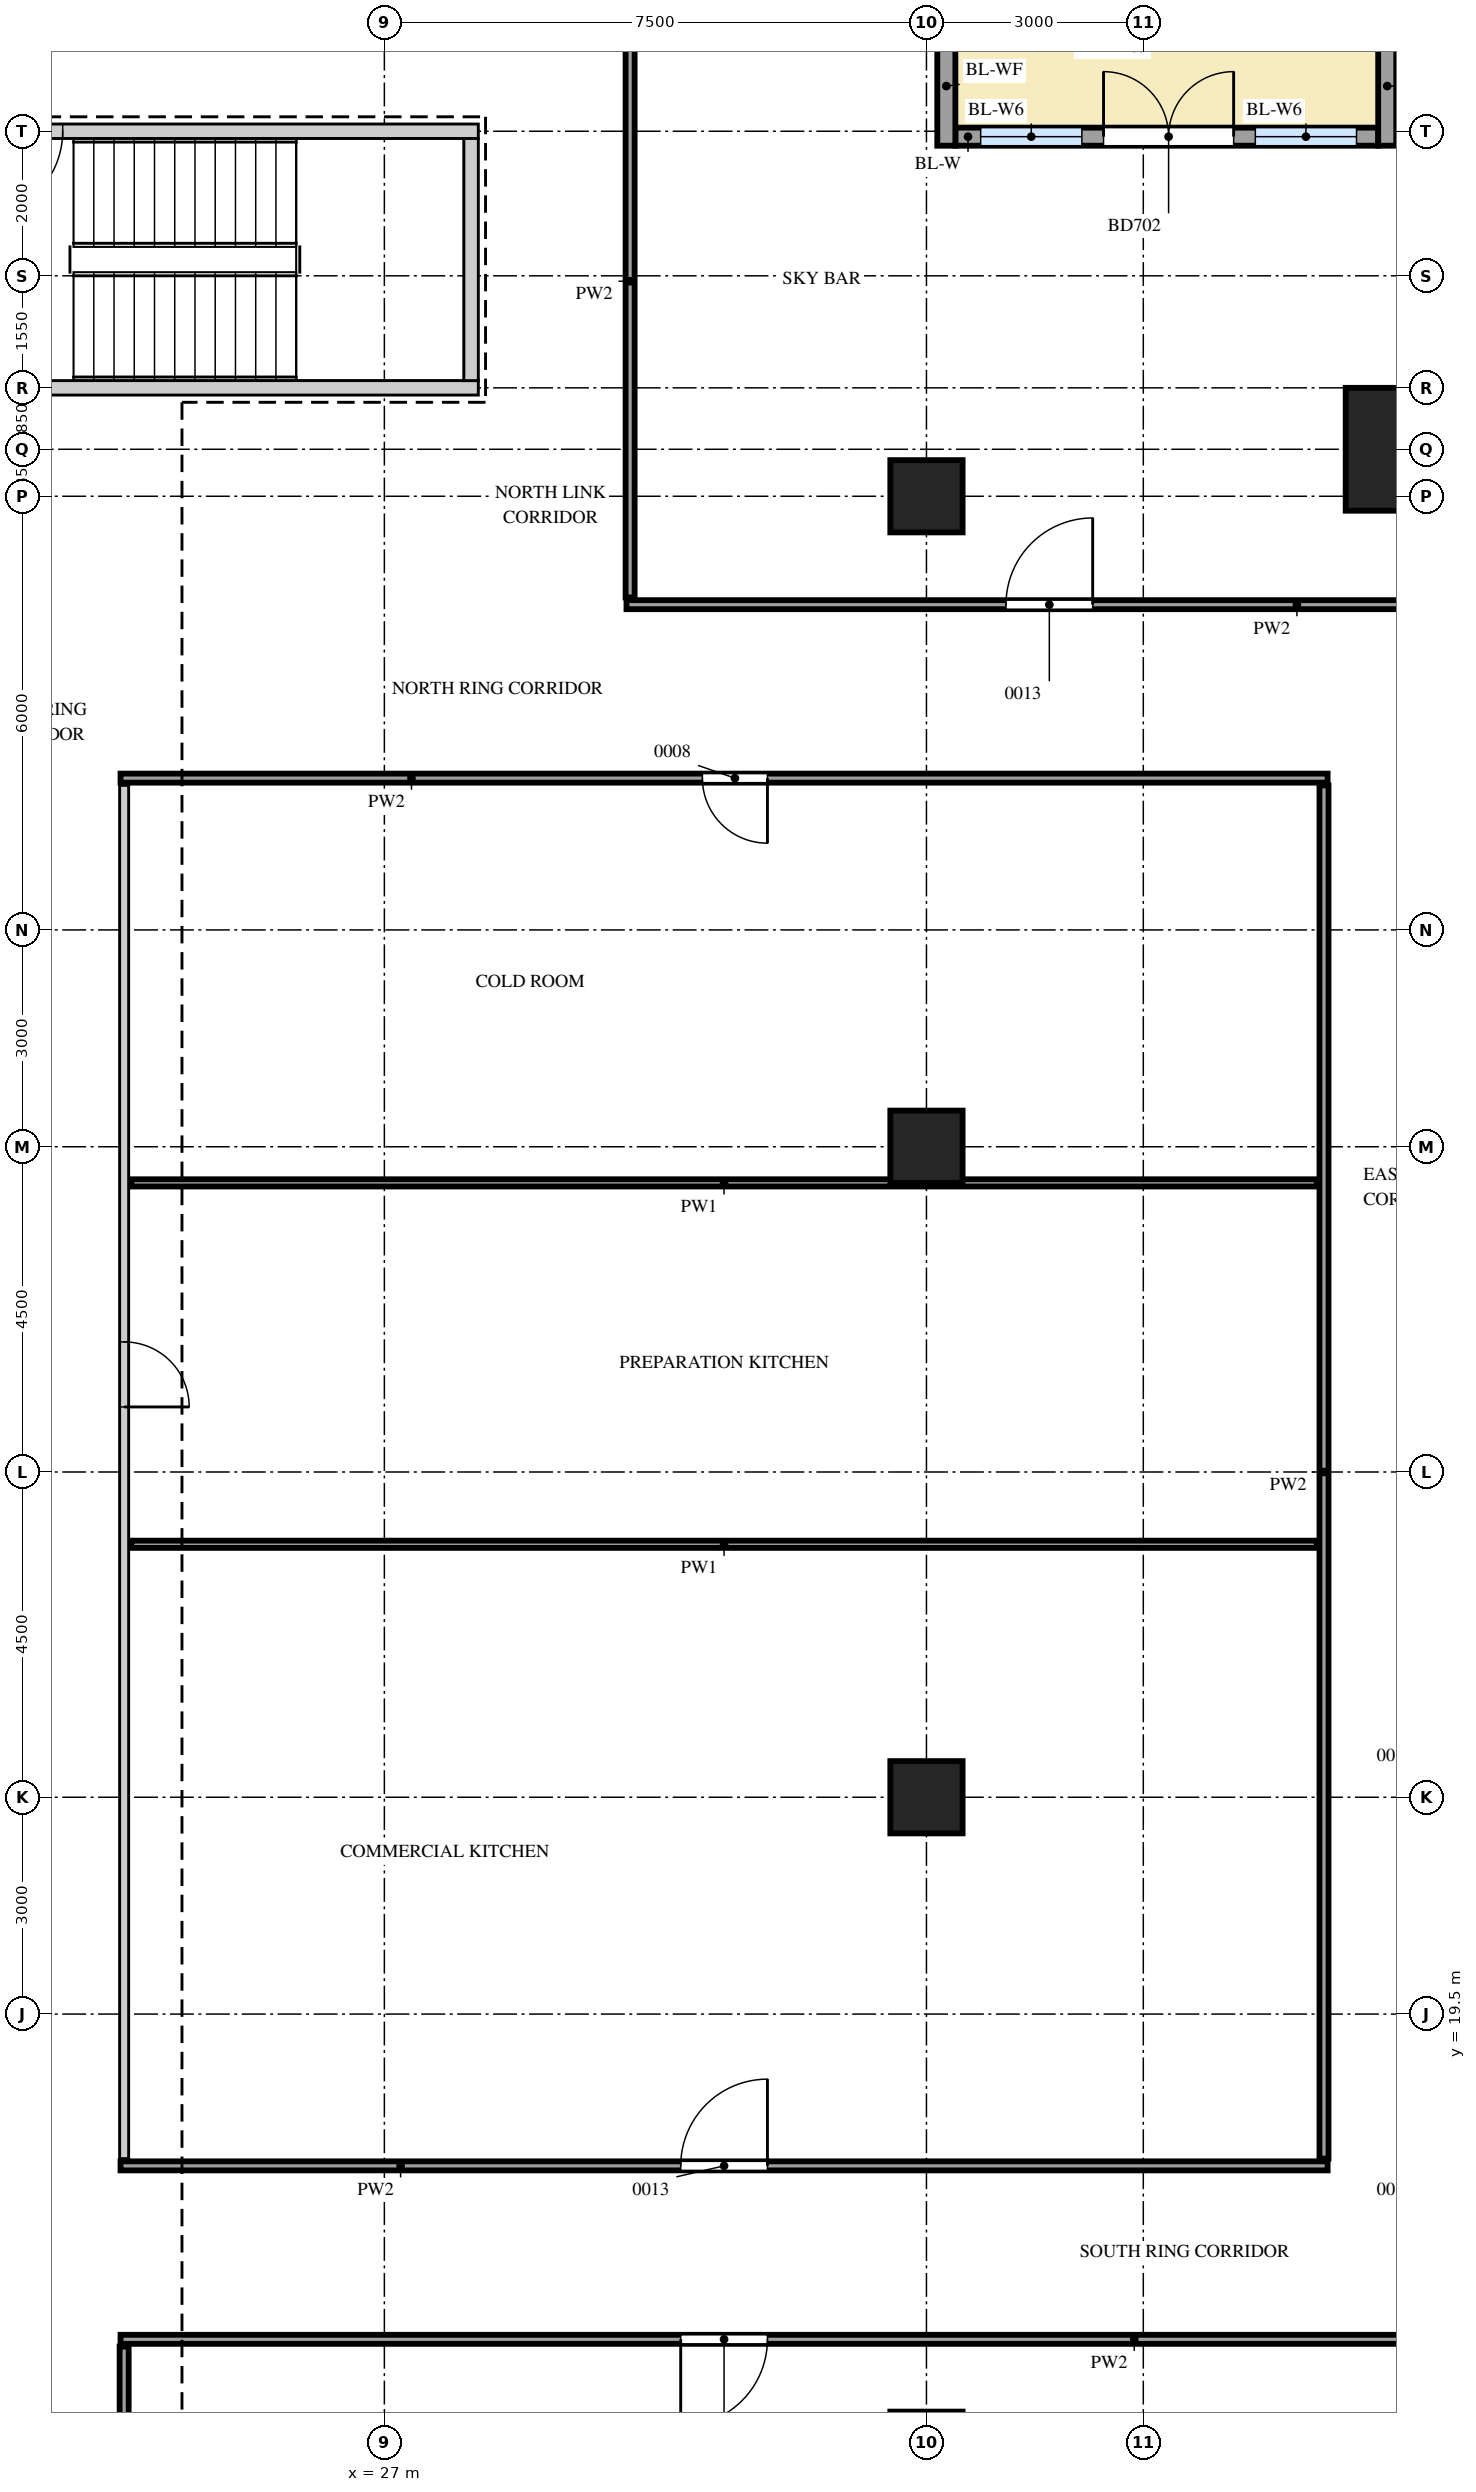
"""IFC4 building model, lengths in metres.
Left out: names, types, materials, properties, quantities, classifications, styles, units other than length and angle.
Written with IfcOpenShell. Run it as: python <this file> out.ifc"""

import sys

from ifc_helpers import new_model, si_unit, direction, frame, frame_2d, origin, origin_2d, place, context, subcontext, project, spatial, rectangle, extrude, source, transform, mapped, element, fill, save


model = new_model("IFC4")
c1 = context("Model", 3, precision=1e-05, world=origin(), true_north=direction((0.0, 1.0)))
c2 = subcontext(c1, "Body", "Model", "MODEL_VIEW")
j1 = project(units=[si_unit("LENGTHUNIT", "METRE"), si_unit("PLANEANGLEUNIT", "RADIAN")], contexts=[c1])
p1 = place(None, origin())
s1 = spatial("IfcSite", under=j1, at=p1, CompositionType="ELEMENT")
p2 = place(p1, origin())
s2 = spatial("IfcBuilding", under=s1, at=p2, CompositionType="ELEMENT")
p3 = place(p2, frame((0.0, 0.0, 310.2)))
s3 = spatial("IfcBuildingStorey", under=s2, at=p3, CompositionType="ELEMENT", Elevation=310.2)
m1 = source(origin(), c2, "Body", "SweptSolid", [
    extrude(rectangle(XDim=7.1, YDim=0.2, at=frame_2d((3.55, 0.0))), origin(), (0.0, 0.0, 1.0), 3.75),
])
p4 = place(p3, frame((21.2, 45.55, 0.0), z_axis=(0.0, 0.0, 1.0), x_axis=(1.0, 0.0, 0.0)))
e1 = element("IfcWall", 1, at=p4, inside=s3, PredefinedType="SHEAR", context=c2, shape_type="MappedRepresentation", body=[
    mapped(m1, transform((0.0, 0.0, 0.0))),
])
m2 = source(origin(), c2, "Body", "SweptSolid", [
    extrude(rectangle(XDim=1.2, YDim=2.1, at=frame_2d((0.6, 1.05))), frame((0.0, 0.11, 0.0), z_axis=(0.0, -1.0, 0.0), x_axis=(1.0, 0.0, 0.0)), (0.0, 0.0, 1.0), 0.22),
])
p5 = place(p4, frame((0.15, 0.0, 0.0)))
e2 = element("IfcOpeningElement", 2, at=p5, cuts=e1, PredefinedType="OPENING", context=c2, shape_type="MappedRepresentation", body=[
    mapped(m2, transform((0.0, 0.0, 0.0))),
])
p6 = place(p3, frame((21.2, 42.0, 0.0), z_axis=(0.0, 0.0, 1.0), x_axis=(1.0, 0.0, 0.0)))
e3 = element("IfcWall", 3, at=p6, inside=s3, PredefinedType="SHEAR", context=c2, shape_type="MappedRepresentation", body=[
    mapped(m1, transform((0.0, 0.0, 0.0))),
])
m3 = source(origin(), c2, "Body", "SweptSolid", [
    extrude(rectangle(XDim=3.35, YDim=0.2, at=frame_2d((1.675, 0.0))), origin(), (0.0, 0.0, 1.0), 3.75),
])
p7 = place(p3, frame((28.2, 42.1, 0.0), z_axis=(0.0, 0.0, 1.0), x_axis=(0.0, 1.0, 0.0)))
e4 = element("IfcWall", 4, at=p7, inside=s3, PredefinedType="SHEAR", context=c2, shape_type="MappedRepresentation", body=[
    mapped(m3, transform((0.0, 0.0, 0.0))),
])
m4 = source(origin(), c2, "Body", "SweptSolid", [
    extrude(rectangle(XDim=1.7, YDim=1.7, at=origin_2d()), origin(), (0.0, 0.0, 1.0), 3.75),
])
p8 = place(p3, frame((41.15, 41.15, 0.0), z_axis=(0.0, 0.0, 1.0), x_axis=(1.0, 0.0, 0.0)))
e5 = element("IfcColumn", 5, at=p8, inside=s3, PredefinedType="COLUMN", context=c2, shape_type="MappedRepresentation", body=[
    mapped(m4, transform((0.0, 0.0, 0.0))),
])
m5 = source(origin(), c2, "Body", "SweptSolid", [
    extrude(rectangle(XDim=1.0, YDim=1.0, at=origin_2d()), origin(), (0.0, 0.0, 1.0), 3.75),
])
for number, where, z_axis, x_axis in (
    (6, (34.5, 22.5, 0.0), (0.0, 0.0, 1.0), (1.0, 0.0, 0.0)),
    (7, (34.5, 31.5, 0.0), (0.0, 0.0, 1.0), (1.0, 0.0, 0.0)),
    (8, (34.5, 40.5, 0.0), (0.0, 0.0, 1.0), (1.0, 0.0, 0.0)),
):
    element("IfcColumn", number, at=place(p3, frame(where, z_axis=z_axis, x_axis=x_axis)), inside=s3, PredefinedType="COLUMN", context=c2, shape_type="MappedRepresentation", body=[
        mapped(m5, transform((0.0, 0.0, 0.0))),
    ])
m6 = source(origin(), c2, "Body", "SweptSolid", [
    extrude(rectangle(XDim=5.85, YDim=0.25, at=frame_2d((2.925, 0.0))), origin(), (0.0, 0.0, 1.0), 3.75),
])
p9 = place(p3, frame((34.9, 45.475, 0.0), z_axis=(0.0, 0.0, 1.0), x_axis=(1.0, 0.0, 0.0)))
e9 = element("IfcWall", 9, at=p9, inside=s3, PredefinedType="SOLIDWALL", context=c2, shape_type="MappedRepresentation", body=[
    mapped(m6, transform((0.0, 0.0, 0.0))),
])
m7 = source(origin(), c2, "Body", "SweptSolid", [
    extrude(rectangle(XDim=1.4, YDim=2.4, at=frame_2d((0.7, 1.2))), frame((0.0, 0.135, 0.0), z_axis=(0.0, -1.0, 0.0), x_axis=(1.0, 0.0, 0.0)), (0.0, 0.0, 1.0), 0.27),
])
p10 = place(p9, frame((0.35, 0.0, 0.0)))
e10 = element("IfcOpeningElement", 10, at=p10, cuts=e9, PredefinedType="OPENING", context=c2, shape_type="MappedRepresentation", body=[
    mapped(m7, transform((0.0, 0.0, 0.0))),
])
p11 = place(p9, frame((4.15, 0.0, 0.0)))
e11 = element("IfcOpeningElement", 11, at=p11, cuts=e9, PredefinedType="OPENING", context=c2, shape_type="MappedRepresentation", body=[
    mapped(m7, transform((0.0, 0.0, 0.0))),
])
m8 = source(origin(), c2, "Body", "SweptSolid", [
    extrude(rectangle(XDim=1.8, YDim=2.4, at=frame_2d((0.9, 1.2))), frame((0.0, 0.135, 0.0), z_axis=(0.0, -1.0, 0.0), x_axis=(1.0, 0.0, 0.0)), (0.0, 0.0, 1.0), 0.27),
])
p12 = place(p9, frame((2.05, 0.0, 0.0)))
e12 = element("IfcOpeningElement", 12, at=p12, cuts=e9, PredefinedType="OPENING", context=c2, shape_type="MappedRepresentation", body=[
    mapped(m8, transform((0.0, 0.0, 0.0))),
])
m9 = source(origin(), c2, "Body", "SweptSolid", [
    extrude(rectangle(XDim=1.65, YDim=0.25, at=frame_2d((0.825, 0.0))), origin(), (0.0, 0.0, 1.0), 3.45),
])
for number, where, z_axis, x_axis in (
    (13, (34.775, 47.0, 0.0), (0.0, 0.0, 1.0), (0.0, -1.0, 0.0)),
    (14, (40.875, 47.0, 0.0), (0.0, 0.0, 1.0), (0.0, -1.0, 0.0)),
):
    element("IfcWall", number, at=place(p3, frame(where, z_axis=z_axis, x_axis=x_axis)), inside=s3, PredefinedType="SOLIDWALL", context=c2, shape_type="MappedRepresentation", body=[
        mapped(m9, transform((0.0, 0.0, 0.0))),
    ])
m10 = source(origin(), c2, "Body", "SweptSolid", [
    extrude(rectangle(XDim=8.75, YDim=0.125, at=frame_2d((4.375, 0.0))), origin(), (0.0, 0.0, 1.0), 3.8),
])
p13 = place(p3, frame((23.4, 6.15, 0.0), z_axis=(0.0, 0.0, 1.0), x_axis=(0.0, 1.0, 0.0)))
e15 = element("IfcWall", 15, at=p13, inside=s3, PredefinedType="PARTITIONING", context=c2, shape_type="MappedRepresentation", body=[
    mapped(m10, transform((0.0, 0.0, 0.0))),
])
m11 = source(origin(), c2, "Body", "SweptSolid", [
    extrude(rectangle(XDim=19.1, YDim=0.125, at=frame_2d((9.55, 0.0))), origin(), (0.0, 0.0, 1.0), 3.8),
])
p14 = place(p3, frame((23.35, 15.0, 0.0), z_axis=(0.0, 0.0, 1.0), x_axis=(1.0, 0.0, 0.0)))
e16 = element("IfcWall", 16, at=p14, inside=s3, PredefinedType="PARTITIONING", context=c2, shape_type="MappedRepresentation", body=[
    mapped(m11, transform((0.0, 0.0, 0.0))),
])
m12 = source(origin(), c2, "Body", "SweptSolid", [
    extrude(rectangle(XDim=1.2, YDim=2.1, at=frame_2d((0.6, 1.05))), frame((0.0, 0.073, 0.0), z_axis=(0.0, -1.0, 0.0), x_axis=(1.0, 0.0, 0.0)), (0.0, 0.0, 1.0), 0.145),
])
p15 = place(p14, frame((7.75, 0.0, 0.0)))
e17 = element("IfcOpeningElement", 17, at=p15, cuts=e16, PredefinedType="OPENING", context=c2, shape_type="MappedRepresentation", body=[
    mapped(m12, transform((0.0, 0.0, 0.0))),
])
m13 = source(origin(), c2, "Body", "SweptSolid", [
    extrude(rectangle(XDim=16.7, YDim=0.125, at=frame_2d((8.35, 0.0))), origin(), (0.0, 0.0, 1.0), 3.8),
])
p16 = place(p3, frame((23.35, 17.4, 0.0), z_axis=(0.0, 0.0, 1.0), x_axis=(1.0, 0.0, 0.0)))
e18 = element("IfcWall", 18, at=p16, inside=s3, PredefinedType="PARTITIONING", context=c2, shape_type="MappedRepresentation", body=[
    mapped(m13, transform((0.0, 0.0, 0.0))),
])
p17 = place(p16, frame((7.75, 0.0, 0.0)))
e19 = element("IfcOpeningElement", 19, at=p17, cuts=e18, PredefinedType="OPENING", context=c2, shape_type="MappedRepresentation", body=[
    mapped(m12, transform((0.0, 0.0, 0.0))),
])
m14 = source(origin(), c2, "Body", "SweptSolid", [
    extrude(rectangle(XDim=19.0, YDim=0.125, at=frame_2d((9.5, 0.0))), origin(), (0.0, 0.0, 1.0), 3.8),
])
p18 = place(p3, frame((23.4, 17.5, 0.0), z_axis=(0.0, 0.0, 1.0), x_axis=(0.0, 1.0, 0.0)))
e20 = element("IfcWall", 20, at=p18, inside=s3, PredefinedType="PARTITIONING", context=c2, shape_type="MappedRepresentation", body=[
    mapped(m14, transform((0.0, 0.0, 0.0))),
])
m15 = source(origin(), c2, "Body", "SweptSolid", [
    extrude(rectangle(XDim=0.9, YDim=2.1, at=frame_2d((0.45, 1.05))), frame((0.0, 0.073, 0.0), z_axis=(0.0, -1.0, 0.0), x_axis=(1.0, 0.0, 0.0)), (0.0, 0.0, 1.0), 0.145),
])
p19 = place(p18, frame((10.4, 0.0, 0.0)))
e21 = element("IfcOpeningElement", 21, at=p19, cuts=e20, PredefinedType="OPENING", context=c2, shape_type="MappedRepresentation", body=[
    mapped(m15, transform((0.0, 0.0, 0.0))),
])
p20 = place(p3, frame((40.0, 17.5, 0.0), z_axis=(0.0, 0.0, 1.0), x_axis=(0.0, 1.0, 0.0)))
e22 = element("IfcWall", 22, at=p20, inside=s3, PredefinedType="PARTITIONING", context=c2, shape_type="MappedRepresentation", body=[
    mapped(m14, transform((0.0, 0.0, 0.0))),
])
m16 = source(origin(), c2, "Body", "SweptSolid", [
    extrude(rectangle(XDim=16.4, YDim=0.1, at=frame_2d((8.2, 0.0))), origin(), (0.0, 0.0, 1.0), 3.8),
])
for number, where, z_axis, x_axis in (
    (23, (23.5, 26.0, 0.0), (0.0, 0.0, 1.0), (1.0, 0.0, 0.0)),
    (24, (23.5, 31.0, 0.0), (0.0, 0.0, 1.0), (1.0, 0.0, 0.0)),
):
    element("IfcWall", number, at=place(p3, frame(where, z_axis=z_axis, x_axis=x_axis)), inside=s3, PredefinedType="PARTITIONING", context=c2, shape_type="MappedRepresentation", body=[
        mapped(m16, transform((0.0, 0.0, 0.0))),
    ])
p21 = place(p3, frame((23.35, 36.6, 0.0), z_axis=(0.0, 0.0, 1.0), x_axis=(1.0, 0.0, 0.0)))
e25 = element("IfcWall", 25, at=p21, inside=s3, PredefinedType="PARTITIONING", context=c2, shape_type="MappedRepresentation", body=[
    mapped(m13, transform((0.0, 0.0, 0.0))),
])
p22 = place(p21, frame((8.05, 0.0, 0.0)))
e26 = element("IfcOpeningElement", 26, at=p22, cuts=e25, PredefinedType="OPENING", context=c2, shape_type="MappedRepresentation", body=[
    mapped(m15, transform((0.0, 0.0, 0.0))),
])
m17 = source(origin(), c2, "Body", "SweptSolid", [
    extrude(rectangle(XDim=12.1, YDim=0.125, at=frame_2d((6.05, 0.0))), origin(), (0.0, 0.0, 1.0), 3.8),
])
p23 = place(p3, frame((30.35, 39.0, 0.0), z_axis=(0.0, 0.0, 1.0), x_axis=(1.0, 0.0, 0.0)))
e27 = element("IfcWall", 27, at=p23, inside=s3, PredefinedType="PARTITIONING", context=c2, shape_type="MappedRepresentation", body=[
    mapped(m17, transform((0.0, 0.0, 0.0))),
])
p24 = place(p23, frame((5.25, 0.0, 0.0)))
e28 = element("IfcOpeningElement", 28, at=p24, cuts=e27, PredefinedType="OPENING", context=c2, shape_type="MappedRepresentation", body=[
    mapped(m12, transform((0.0, 0.0, 0.0))),
])
p25 = place(p3, frame((30.4, 39.1, 0.0), z_axis=(0.0, 0.0, 1.0), x_axis=(0.0, 1.0, 0.0)))
e29 = element("IfcWall", 29, at=p25, inside=s3, PredefinedType="PARTITIONING", context=c2, shape_type="MappedRepresentation", body=[
    mapped(m10, transform((0.0, 0.0, 0.0))),
])
m18 = source(origin(), c2, "Body", "SweptSolid", [
    extrude(rectangle(XDim=1.4, YDim=2.4, at=frame_2d((0.7, 1.2))), frame((0.0, 0.03, 0.0), z_axis=(0.0, -1.0, 0.0), x_axis=(1.0, 0.0, 0.0)), (0.0, 0.0, 1.0), 0.06),
])
p26 = place(p10, origin())
e30 = element("IfcWindow", 30, at=p26, inside=s3, PartitioningType="SINGLE_PANEL", PredefinedType="WINDOW", context=c2, shape_type="MappedRepresentation", body=[
    mapped(m18, transform((0.0, 0.0, 0.0))),
])
fill(e10, e30)
p27 = place(p11, origin())
e31 = element("IfcWindow", 31, at=p27, inside=s3, PartitioningType="SINGLE_PANEL", PredefinedType="WINDOW", context=c2, shape_type="MappedRepresentation", body=[
    mapped(m18, transform((0.0, 0.0, 0.0))),
])
fill(e11, e31)
m19 = source(origin(), c2, "Body", "SweptSolid", [
    extrude(rectangle(XDim=1.8, YDim=2.4, at=frame_2d((0.9, 1.2))), frame((0.0, 0.025, 0.0), z_axis=(0.0, -1.0, 0.0), x_axis=(1.0, 0.0, 0.0)), (0.0, 0.0, 1.0), 0.05),
])
p28 = place(p12, origin())
e32 = element("IfcDoor", 32, at=p28, inside=s3, OperationType="DOUBLE_DOOR_DOUBLE_SWING", PredefinedType="DOOR", context=c2, shape_type="MappedRepresentation", body=[
    mapped(m19, transform((0.0, 0.0, 0.0))),
])
fill(e12, e32)
m20 = source(origin(), c2, "Body", "SweptSolid", [
    extrude(rectangle(XDim=1.2, YDim=2.1, at=frame_2d((0.6, 1.05))), frame((0.0, 0.025, 0.0), z_axis=(0.0, -1.0, 0.0), x_axis=(1.0, 0.0, 0.0)), (0.0, 0.0, 1.0), 0.05),
])
p29 = place(p15, origin())
e33 = element("IfcDoor", 33, at=p29, inside=s3, OperationType="SINGLE_SWING_LEFT", PredefinedType="DOOR", context=c2, shape_type="MappedRepresentation", body=[
    mapped(m20, transform((0.0, 0.0, 0.0))),
])
fill(e17, e33)
p30 = place(p24, origin())
e34 = element("IfcDoor", 34, at=p30, inside=s3, OperationType="SINGLE_SWING_LEFT", PredefinedType="DOOR", context=c2, shape_type="MappedRepresentation", body=[
    mapped(m20, transform((0.0, 0.0, 0.0))),
])
fill(e28, e34)
p31 = place(p17, origin())
e35 = element("IfcDoor", 35, at=p31, inside=s3, OperationType="SINGLE_SWING_LEFT", PredefinedType="DOOR", context=c2, shape_type="MappedRepresentation", body=[
    mapped(m20, transform((0.0, 0.0, 0.0))),
])
fill(e19, e35)
m21 = source(origin(), c2, "Body", "SweptSolid", [
    extrude(rectangle(XDim=0.9, YDim=2.1, at=frame_2d((0.45, 1.05))), frame((0.0, 0.025, 0.0), z_axis=(0.0, -1.0, 0.0), x_axis=(1.0, 0.0, 0.0)), (0.0, 0.0, 1.0), 0.05),
])
p32 = place(p19, origin())
e36 = element("IfcDoor", 36, at=p32, inside=s3, OperationType="SINGLE_SWING_LEFT", PredefinedType="DOOR", context=c2, shape_type="MappedRepresentation", body=[
    mapped(m21, transform((0.0, 0.0, 0.0))),
])
fill(e21, e36)
p33 = place(p22, origin())
e37 = element("IfcDoor", 37, at=p33, inside=s3, OperationType="SINGLE_SWING_RIGHT", PredefinedType="DOOR", context=c2, shape_type="MappedRepresentation", body=[
    mapped(m21, transform((0.0, 0.0, 0.0))),
])
fill(e26, e37)
p34 = place(p5, origin())
e38 = element("IfcDoor", 38, at=p34, inside=s3, OperationType="SINGLE_SWING_LEFT", PredefinedType="DOOR", context=c2, shape_type="MappedRepresentation", body=[
    mapped(m20, transform((0.0, 0.0, 0.0))),
])
fill(e2, e38)
save(model, sys.argv[1])
